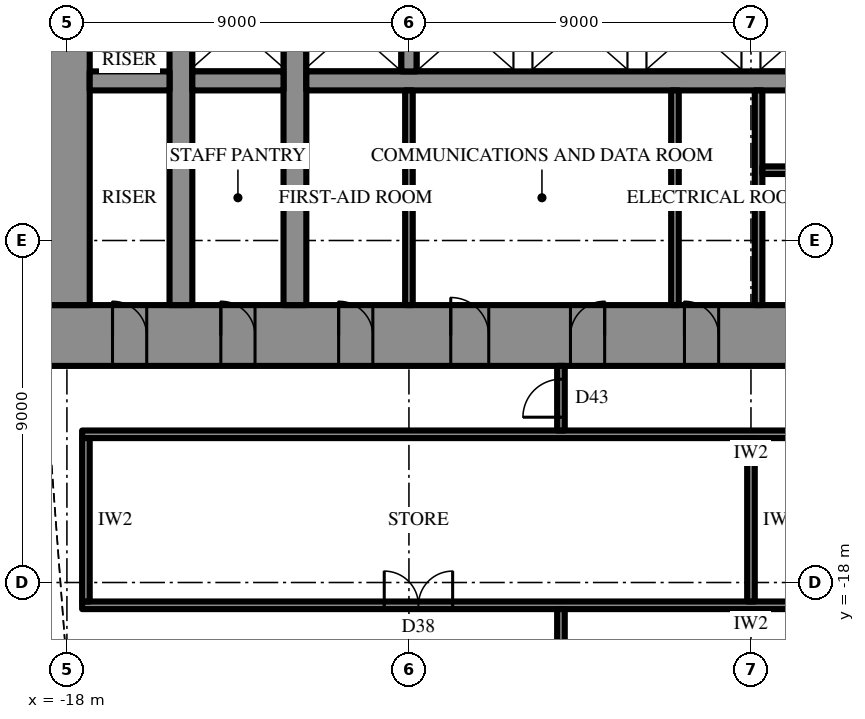
"""IFC4 building model, lengths in metres.
Left out: names, types, materials, properties, quantities, classifications, styles, units other than length and angle.
Written with IfcOpenShell. Run it as: python <this file> out.ifc"""

import sys

from ifc_helpers import new_model, si_unit, direction, frame, frame_2d, origin, place, context, subcontext, project, spatial, rectangle, extrude, element, fill, save


model = new_model("IFC4")
c1 = context("Model", 3, precision=1e-05, world=origin(), true_north=direction((0.0, 1.0)))
c2 = subcontext(c1, "Body", "Model", "MODEL_VIEW")
j1 = project(units=[si_unit("LENGTHUNIT", "METRE"), si_unit("PLANEANGLEUNIT", "RADIAN")], contexts=[c1])
p1 = place(None, origin())
s1 = spatial("IfcSite", under=j1, at=p1, CompositionType="ELEMENT")
p2 = place(p1, origin())
s2 = spatial("IfcBuilding", under=s1, at=p2, CompositionType="ELEMENT")
p3 = place(p2, frame((0.0, 0.0, 182.5)))
s3 = spatial("IfcBuildingStorey", under=s2, at=p3, CompositionType="ELEMENT", Elevation=182.5)
p4 = place(p3, frame((18.6, -11.5, 0.0), z_axis=(0.0, 0.0, 1.0), x_axis=(-1.0, 0.0, 0.0)))
e1 = element("IfcWall", 1, at=p4, inside=s3, PredefinedType="SHEAR", context=c2, shape_type="SweptSolid", body=[
    extrude(rectangle(XDim=37.2, YDim=1.6, at=frame_2d((18.6, 0.0))), origin(), (0.0, 0.0, 1.0), 4.2),
])
p5 = place(p4, frame((19.45, 0.0, 0.0)))
e2 = element("IfcOpeningElement", 2, at=p5, cuts=e1, PredefinedType="OPENING", context=c2, shape_type="SweptSolid", body=[
    extrude(rectangle(XDim=0.9, YDim=2.2, at=frame_2d((0.45, 1.1))), frame((0.0, 0.81, 0.0), z_axis=(0.0, -1.0, 0.0), x_axis=(1.0, 0.0, 0.0)), (0.0, 0.0, 1.0), 1.62),
])
p6 = place(p4, frame((22.45, 0.0, 0.0)))
e3 = element("IfcOpeningElement", 3, at=p6, cuts=e1, PredefinedType="OPENING", context=c2, shape_type="SweptSolid", body=[
    extrude(rectangle(XDim=0.9, YDim=2.2, at=frame_2d((0.45, 1.1))), frame((0.0, 0.81, 0.0), z_axis=(0.0, -1.0, 0.0), x_axis=(1.0, 0.0, 0.0)), (0.0, 0.0, 1.0), 1.62),
])
p7 = place(p4, frame((25.5, 0.0, 0.0)))
e4 = element("IfcOpeningElement", 4, at=p7, cuts=e1, PredefinedType="OPENING", context=c2, shape_type="SweptSolid", body=[
    extrude(rectangle(XDim=1.0, YDim=2.2, at=frame_2d((0.5, 1.1))), frame((0.0, 0.81, 0.0), z_axis=(0.0, -1.0, 0.0), x_axis=(1.0, 0.0, 0.0)), (0.0, 0.0, 1.0), 1.62),
])
p8 = place(p4, frame((1.8, 0.0, 0.0)))
e5 = element("IfcOpeningElement", 5, at=p8, cuts=e1, PredefinedType="OPENING", context=c2, shape_type="SweptSolid", body=[
    extrude(rectangle(XDim=0.9, YDim=2.2, at=frame_2d((0.45, 1.1))), frame((0.0, 0.81, 0.0), z_axis=(0.0, -1.0, 0.0), x_axis=(1.0, 0.0, 0.0)), (0.0, 0.0, 1.0), 1.62),
])
p9 = place(p4, frame((4.65, 0.0, 0.0)))
e6 = element("IfcOpeningElement", 6, at=p9, cuts=e1, PredefinedType="OPENING", context=c2, shape_type="SweptSolid", body=[
    extrude(rectangle(XDim=0.9, YDim=2.2, at=frame_2d((0.45, 1.1))), frame((0.0, 0.81, 0.0), z_axis=(0.0, -1.0, 0.0), x_axis=(1.0, 0.0, 0.0)), (0.0, 0.0, 1.0), 1.62),
])
p10 = place(p4, frame((7.75, 0.0, 0.0)))
e7 = element("IfcOpeningElement", 7, at=p10, cuts=e1, PredefinedType="OPENING", context=c2, shape_type="SweptSolid", body=[
    extrude(rectangle(XDim=0.9, YDim=2.2, at=frame_2d((0.45, 1.1))), frame((0.0, 0.81, 0.0), z_axis=(0.0, -1.0, 0.0), x_axis=(1.0, 0.0, 0.0)), (0.0, 0.0, 1.0), 1.62),
])
p11 = place(p4, frame((28.55, 0.0, 0.0)))
e8 = element("IfcOpeningElement", 8, at=p11, cuts=e1, PredefinedType="OPENING", context=c2, shape_type="SweptSolid", body=[
    extrude(rectangle(XDim=0.9, YDim=2.2, at=frame_2d((0.45, 1.1))), frame((0.0, 0.81, 0.0), z_axis=(0.0, -1.0, 0.0), x_axis=(1.0, 0.0, 0.0)), (0.0, 0.0, 1.0), 1.62),
])
p12 = place(p4, frame((31.65, 0.0, 0.0)))
e9 = element("IfcOpeningElement", 9, at=p12, cuts=e1, PredefinedType="OPENING", context=c2, shape_type="SweptSolid", body=[
    extrude(rectangle(XDim=0.9, YDim=2.2, at=frame_2d((0.45, 1.1))), frame((0.0, 0.81, 0.0), z_axis=(0.0, -1.0, 0.0), x_axis=(1.0, 0.0, 0.0)), (0.0, 0.0, 1.0), 1.62),
])
p13 = place(p4, frame((34.5, 0.0, 0.0)))
e10 = element("IfcOpeningElement", 10, at=p13, cuts=e1, PredefinedType="OPENING", context=c2, shape_type="SweptSolid", body=[
    extrude(rectangle(XDim=0.9, YDim=2.2, at=frame_2d((0.45, 1.1))), frame((0.0, 0.81, 0.0), z_axis=(0.0, -1.0, 0.0), x_axis=(1.0, 0.0, 0.0)), (0.0, 0.0, 1.0), 1.62),
])
p14 = place(p3, frame((-18.0, 10.7, 0.0), z_axis=(0.0, 0.0, 1.0), x_axis=(0.0, -1.0, 0.0)))
e11 = element("IfcWall", 11, at=p14, inside=s3, PredefinedType="SHEAR", context=c2, shape_type="SweptSolid", body=[
    extrude(rectangle(XDim=21.4, YDim=1.2, at=frame_2d((10.7, 0.0))), origin(), (0.0, 0.0, 1.0), 4.2),
])
p15 = place(p14, frame((9.8, 0.0, 0.0)))
e12 = element("IfcOpeningElement", 12, at=p15, cuts=e11, PredefinedType="OPENING", context=c2, shape_type="SweptSolid", body=[
    extrude(rectangle(XDim=1.8, YDim=2.4, at=frame_2d((0.9, 1.2))), frame((0.0, 0.61, 0.0), z_axis=(0.0, -1.0, 0.0), x_axis=(1.0, 0.0, 0.0)), (0.0, 0.0, 1.0), 1.22),
])
p16 = place(p3, frame((-12.0, -10.7, 0.0), z_axis=(0.0, 0.0, 1.0), x_axis=(0.0, 1.0, 0.0)))
e13 = element("IfcWall", 13, at=p16, inside=s3, PredefinedType="SHEAR", context=c2, shape_type="SweptSolid", body=[
    extrude(rectangle(XDim=21.4, YDim=0.6, at=frame_2d((10.7, 0.0))), origin(), (0.0, 0.0, 1.0), 4.2),
])
p17 = place(p16, frame((9.8, 0.0, 0.0)))
e14 = element("IfcOpeningElement", 14, at=p17, cuts=e13, PredefinedType="OPENING", context=c2, shape_type="SweptSolid", body=[
    extrude(rectangle(XDim=1.8, YDim=2.4, at=frame_2d((0.9, 1.2))), frame((0.0, 0.31, 0.0), z_axis=(0.0, -1.0, 0.0), x_axis=(1.0, 0.0, 0.0)), (0.0, 0.0, 1.0), 0.62),
])
p18 = place(p3, frame((-15.0, -10.7, 0.0), z_axis=(0.0, 0.0, 1.0), x_axis=(0.0, 1.0, 0.0)))
e15 = element("IfcWall", 15, at=p18, inside=s3, PredefinedType="SHEAR", context=c2, shape_type="SweptSolid", body=[
    extrude(rectangle(XDim=21.4, YDim=0.6, at=frame_2d((10.7, 0.0))), origin(), (0.0, 0.0, 1.0), 4.2),
])
p19 = place(p18, frame((9.8, 0.0, 0.0)))
e16 = element("IfcOpeningElement", 16, at=p19, cuts=e15, PredefinedType="OPENING", context=c2, shape_type="SweptSolid", body=[
    extrude(rectangle(XDim=1.8, YDim=2.4, at=frame_2d((0.9, 1.2))), frame((0.0, 0.31, 0.0), z_axis=(0.0, -1.0, 0.0), x_axis=(1.0, 0.0, 0.0)), (0.0, 0.0, 1.0), 0.62),
])
p20 = place(p3, frame((11.7, -4.8, 0.0), z_axis=(0.0, 0.0, 1.0), x_axis=(-1.0, 0.0, 0.0)))
e17 = element("IfcWall", 17, at=p20, inside=s3, PredefinedType="SHEAR", context=c2, shape_type="SweptSolid", body=[
    extrude(rectangle(XDim=23.4, YDim=0.5, at=frame_2d((11.7, 0.0))), origin(), (0.0, 0.0, 1.0), 4.2),
])
p21 = place(p20, frame((6.6, 0.0, 0.0)))
e18 = element("IfcOpeningElement", 18, at=p21, cuts=e17, PredefinedType="OPENING", context=c2, shape_type="SweptSolid", body=[
    extrude(rectangle(XDim=1.2, YDim=2.2, at=frame_2d((0.6, 1.1))), frame((0.0, 0.26, 0.0), z_axis=(0.0, -1.0, 0.0), x_axis=(1.0, 0.0, 0.0)), (0.0, 0.0, 1.0), 0.52),
])
p22 = place(p20, frame((3.6, 0.0, 0.0)))
e19 = element("IfcOpeningElement", 19, at=p22, cuts=e17, PredefinedType="OPENING", context=c2, shape_type="SweptSolid", body=[
    extrude(rectangle(XDim=1.2, YDim=2.2, at=frame_2d((0.6, 1.1))), frame((0.0, 0.26, 0.0), z_axis=(0.0, -1.0, 0.0), x_axis=(1.0, 0.0, 0.0)), (0.0, 0.0, 1.0), 0.52),
])
p23 = place(p3, frame((-12.3, -4.8, 0.0), z_axis=(0.0, 0.0, 1.0), x_axis=(-1.0, 0.0, 0.0)))
e20 = element("IfcWall", 20, at=p23, inside=s3, PredefinedType="SHEAR", context=c2, shape_type="SweptSolid", body=[
    extrude(rectangle(XDim=2.4, YDim=0.5, at=frame_2d((1.2, 0.0))), origin(), (0.0, 0.0, 1.0), 4.2),
])
p24 = place(p3, frame((-15.3, -4.8, 0.0), z_axis=(0.0, 0.0, 1.0), x_axis=(-1.0, 0.0, 0.0)))
e21 = element("IfcWall", 21, at=p24, inside=s3, PredefinedType="SHEAR", context=c2, shape_type="SweptSolid", body=[
    extrude(rectangle(XDim=2.1, YDim=0.5, at=frame_2d((1.05, 0.0))), origin(), (0.0, 0.0, 1.0), 4.2),
])
p25 = place(p3, frame((-9.0, -2.25, 0.0), z_axis=(0.0, 0.0, 1.0), x_axis=(0.0, -1.0, 0.0)))
e22 = element("IfcWall", 22, at=p25, inside=s3, PredefinedType="SHEAR", context=c2, shape_type="SweptSolid", body=[
    extrude(rectangle(XDim=2.3, YDim=0.4, at=frame_2d((1.15, 0.0))), origin(), (0.0, 0.0, 1.0), 4.2),
])
p26 = place(p3, frame((0.2, -5.05, 0.0), z_axis=(0.0, 0.0, 1.0), x_axis=(0.0, -1.0, 0.0)))
e23 = element("IfcWall", 23, at=p26, inside=s3, PredefinedType="SHEAR", context=c2, shape_type="SweptSolid", body=[
    extrude(rectangle(XDim=5.65, YDim=0.2, at=frame_2d((2.825, 0.0))), origin(), (0.0, 0.0, 1.0), 4.2),
])
p27 = place(p3, frame((8.9, -7.15, 0.0), z_axis=(0.0, 0.0, 1.0), x_axis=(-1.0, 0.0, 0.0)))
e24 = element("IfcWall", 24, at=p27, inside=s3, PredefinedType="SHEAR", context=c2, shape_type="SweptSolid", body=[
    extrude(rectangle(XDim=8.6, YDim=0.2, at=frame_2d((4.3, 0.0))), origin(), (0.0, 0.0, 1.0), 4.2),
])
p28 = place(p27, frame((0.3, 0.0, 0.0)))
e25 = element("IfcOpeningElement", 25, at=p28, cuts=e24, PredefinedType="OPENING", context=c2, shape_type="SweptSolid", body=[
    extrude(rectangle(XDim=1.0, YDim=2.2, at=frame_2d((0.5, 1.1))), frame((0.0, 0.11, 0.0), z_axis=(0.0, -1.0, 0.0), x_axis=(1.0, 0.0, 0.0)), (0.0, 0.0, 1.0), 0.22),
])
for number, where, z_axis, x_axis in (
    (26, (-9.0, -5.05, 0.0), (0.0, 0.0, 1.0), (0.0, -1.0, 0.0)),
    (27, (-2.0, -5.05, 0.0), (0.0, 0.0, 1.0), (0.0, -1.0, 0.0)),
):
    element("IfcWall", number, at=place(p3, frame(where, z_axis=z_axis, x_axis=x_axis)), inside=s3, PredefinedType="PARTITIONING", context=c2, shape_type="SweptSolid", body=[
        extrude(rectangle(XDim=5.65, YDim=0.2, at=frame_2d((2.825, 0.0))), origin(), (0.0, 0.0, 1.0), 4.0),
    ])
p29 = place(p3, frame((17.6, -14.1, 0.0), z_axis=(0.0, 0.0, 1.0), x_axis=(-1.0, 0.0, 0.0)))
e28 = element("IfcWall", 28, at=p29, inside=s3, PredefinedType="PARTITIONING", context=c2, shape_type="SweptSolid", body=[
    extrude(rectangle(XDim=35.2, YDim=0.2, at=frame_2d((17.6, 0.0))), origin(), (0.0, 0.0, 1.0), 4.0),
])
p30 = place(p3, frame((17.6, -18.6, 0.0), z_axis=(0.0, 0.0, 1.0), x_axis=(-1.0, 0.0, 0.0)))
e29 = element("IfcWall", 29, at=p30, inside=s3, PredefinedType="PARTITIONING", context=c2, shape_type="SweptSolid", body=[
    extrude(rectangle(XDim=35.2, YDim=0.2, at=frame_2d((17.6, 0.0))), origin(), (0.0, 0.0, 1.0), 4.0),
])
p31 = place(p30, frame((7.95, 0.0, 0.0)))
e30 = element("IfcOpeningElement", 30, at=p31, cuts=e29, PredefinedType="OPENING", context=c2, shape_type="SweptSolid", body=[
    extrude(rectangle(XDim=1.8, YDim=2.4, at=frame_2d((0.9, 1.2))), frame((0.0, 0.11, 0.0), z_axis=(0.0, -1.0, 0.0), x_axis=(1.0, 0.0, 0.0)), (0.0, 0.0, 1.0), 0.22),
])
p32 = place(p30, frame((25.45, 0.0, 0.0)))
e31 = element("IfcOpeningElement", 31, at=p32, cuts=e29, PredefinedType="OPENING", context=c2, shape_type="SweptSolid", body=[
    extrude(rectangle(XDim=1.8, YDim=2.4, at=frame_2d((0.9, 1.2))), frame((0.0, 0.11, 0.0), z_axis=(0.0, -1.0, 0.0), x_axis=(1.0, 0.0, 0.0)), (0.0, 0.0, 1.0), 0.22),
])
p33 = place(p3, frame((0.0, -14.2, 0.0), z_axis=(0.0, 0.0, 1.0), x_axis=(0.0, -1.0, 0.0)))
e32 = element("IfcWall", 32, at=p33, inside=s3, PredefinedType="PARTITIONING", context=c2, shape_type="SweptSolid", body=[
    extrude(rectangle(XDim=4.3, YDim=0.2, at=frame_2d((2.15, 0.0))), origin(), (0.0, 0.0, 1.0), 2.992),
])
p34 = place(p3, frame((-17.5, -14.2, 0.0), z_axis=(0.0, 0.0, 1.0), x_axis=(0.0, -1.0, 0.0)))
e33 = element("IfcWall", 33, at=p34, inside=s3, PredefinedType="PARTITIONING", context=c2, shape_type="SweptSolid", body=[
    extrude(rectangle(XDim=4.3, YDim=0.2, at=frame_2d((2.15, 0.0))), origin(), (0.0, 0.0, 1.0), 4.0),
])
p35 = place(p3, frame((-5.0, -12.3, 0.0), z_axis=(0.0, 0.0, 1.0), x_axis=(0.0, -1.0, 0.0)))
e34 = element("IfcWall", 34, at=p35, inside=s3, PredefinedType="PARTITIONING", context=c2, shape_type="SweptSolid", body=[
    extrude(rectangle(XDim=1.7, YDim=0.2, at=frame_2d((0.85, 0.0))), origin(), (0.0, 0.0, 1.0), 2.992),
])
p36 = place(p35, frame((0.35, 0.0, 0.0)))
e35 = element("IfcOpeningElement", 35, at=p36, cuts=e34, PredefinedType="OPENING", context=c2, shape_type="SweptSolid", body=[
    extrude(rectangle(XDim=1.0, YDim=2.2, at=frame_2d((0.5, 1.1))), frame((0.0, 0.11, 0.0), z_axis=(0.0, -1.0, 0.0), x_axis=(1.0, 0.0, 0.0)), (0.0, 0.0, 1.0), 0.22),
])
p37 = place(p3, frame((-5.0, -18.7, 0.0), z_axis=(0.0, 0.0, 1.0), x_axis=(0.0, -1.0, 0.0)))
e36 = element("IfcWall", 36, at=p37, inside=s3, PredefinedType="PARTITIONING", context=c2, shape_type="SweptSolid", body=[
    extrude(rectangle(XDim=6.2, YDim=0.2, at=frame_2d((3.1, 0.0))), origin(), (0.0, 0.0, 1.0), 2.992),
])
p38 = place(p5, frame((0.9, 0.0, 0.0), z_axis=(0.0, 0.0, 1.0), x_axis=(-1.0, 0.0, 0.0)))
e37 = element("IfcDoor", 37, at=p38, inside=s3, OperationType="SINGLE_SWING_RIGHT", PredefinedType="DOOR", context=c2, shape_type="SweptSolid", body=[
    extrude(rectangle(XDim=0.9, YDim=2.2, at=frame_2d((0.45, 1.1))), frame((0.0, 0.025, 0.0), z_axis=(0.0, -1.0, 0.0), x_axis=(1.0, 0.0, 0.0)), (0.0, 0.0, 1.0), 0.05),
])
fill(e2, e37)
p39 = place(p6, frame((0.9, 0.0, 0.0), z_axis=(0.0, 0.0, 1.0), x_axis=(-1.0, 0.0, 0.0)))
e38 = element("IfcDoor", 38, at=p39, inside=s3, OperationType="SINGLE_SWING_LEFT", PredefinedType="DOOR", context=c2, shape_type="SweptSolid", body=[
    extrude(rectangle(XDim=0.9, YDim=2.2, at=frame_2d((0.45, 1.1))), frame((0.0, 0.025, 0.0), z_axis=(0.0, -1.0, 0.0), x_axis=(1.0, 0.0, 0.0)), (0.0, 0.0, 1.0), 0.05),
])
fill(e3, e38)
p40 = place(p7, frame((1.0, 0.0, 0.0), z_axis=(0.0, 0.0, 1.0), x_axis=(-1.0, 0.0, 0.0)))
e39 = element("IfcDoor", 39, at=p40, inside=s3, OperationType="SINGLE_SWING_RIGHT", PredefinedType="DOOR", context=c2, shape_type="SweptSolid", body=[
    extrude(rectangle(XDim=1.0, YDim=2.2, at=frame_2d((0.5, 1.1))), frame((0.0, 0.025, 0.0), z_axis=(0.0, -1.0, 0.0), x_axis=(1.0, 0.0, 0.0)), (0.0, 0.0, 1.0), 0.05),
])
fill(e4, e39)
p41 = place(p11, frame((0.9, 0.0, 0.0), z_axis=(0.0, 0.0, 1.0), x_axis=(-1.0, 0.0, 0.0)))
e40 = element("IfcDoor", 40, at=p41, inside=s3, OperationType="SINGLE_SWING_RIGHT", PredefinedType="DOOR", context=c2, shape_type="SweptSolid", body=[
    extrude(rectangle(XDim=0.9, YDim=2.2, at=frame_2d((0.45, 1.1))), frame((0.0, 0.025, 0.0), z_axis=(0.0, -1.0, 0.0), x_axis=(1.0, 0.0, 0.0)), (0.0, 0.0, 1.0), 0.05),
])
fill(e8, e40)
p42 = place(p12, frame((0.9, 0.0, 0.0), z_axis=(0.0, 0.0, 1.0), x_axis=(-1.0, 0.0, 0.0)))
e41 = element("IfcDoor", 41, at=p42, inside=s3, OperationType="SINGLE_SWING_RIGHT", PredefinedType="DOOR", context=c2, shape_type="SweptSolid", body=[
    extrude(rectangle(XDim=0.9, YDim=2.2, at=frame_2d((0.45, 1.1))), frame((0.0, 0.025, 0.0), z_axis=(0.0, -1.0, 0.0), x_axis=(1.0, 0.0, 0.0)), (0.0, 0.0, 1.0), 0.05),
])
fill(e9, e41)
p43 = place(p13, frame((0.9, 0.0, 0.0), z_axis=(0.0, 0.0, 1.0), x_axis=(-1.0, 0.0, 0.0)))
e42 = element("IfcDoor", 42, at=p43, inside=s3, OperationType="SINGLE_SWING_RIGHT", PredefinedType="DOOR", context=c2, shape_type="SweptSolid", body=[
    extrude(rectangle(XDim=0.9, YDim=2.2, at=frame_2d((0.45, 1.1))), frame((0.0, 0.025, 0.0), z_axis=(0.0, -1.0, 0.0), x_axis=(1.0, 0.0, 0.0)), (0.0, 0.0, 1.0), 0.05),
])
fill(e10, e42)
p44 = place(p32, frame((1.8, 0.0, 0.0), z_axis=(0.0, 0.0, 1.0), x_axis=(-1.0, 0.0, 0.0)))
e43 = element("IfcDoor", 43, at=p44, inside=s3, OperationType="DOUBLE_DOOR_SINGLE_SWING", PredefinedType="DOOR", context=c2, shape_type="SweptSolid", body=[
    extrude(rectangle(XDim=1.8, YDim=2.4, at=frame_2d((0.9, 1.2))), frame((0.0, 0.025, 0.0), z_axis=(0.0, -1.0, 0.0), x_axis=(1.0, 0.0, 0.0)), (0.0, 0.0, 1.0), 0.05),
])
fill(e31, e43)
p45 = place(p36, frame((1.0, 0.0, 0.0), z_axis=(0.0, 0.0, 1.0), x_axis=(-1.0, 0.0, 0.0)))
e44 = element("IfcDoor", 44, at=p45, inside=s3, OperationType="SINGLE_SWING_RIGHT", PredefinedType="DOOR", context=c2, shape_type="SweptSolid", body=[
    extrude(rectangle(XDim=1.0, YDim=2.2, at=frame_2d((0.5, 1.1))), frame((0.0, 0.025, 0.0), z_axis=(0.0, -1.0, 0.0), x_axis=(1.0, 0.0, 0.0)), (0.0, 0.0, 1.0), 0.05),
])
fill(e35, e44)
save(model, sys.argv[1])
